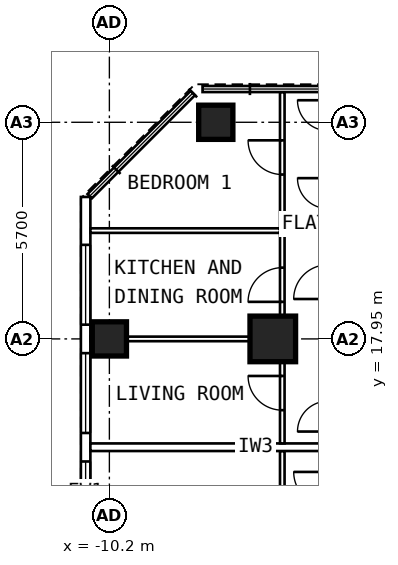
"""IFC4 building model, lengths in metres.
Left out: names, types, materials, properties, quantities, classifications, styles, units other than length and angle.
Written with IfcOpenShell. Run it as: python <this file> out.ifc"""

import sys

from ifc_helpers import new_model, si_unit, direction, frame, frame_2d, origin, origin_2d, place, context, subcontext, project, spatial, rectangle, extrude, element, fill, save


model = new_model("IFC4")
c1 = context("Model", 3, precision=1e-05, world=origin(), true_north=direction((0.0, 1.0)))
c2 = subcontext(c1, "Body", "Model", "MODEL_VIEW")
j1 = project(units=[si_unit("LENGTHUNIT", "METRE"), si_unit("PLANEANGLEUNIT", "RADIAN")], contexts=[c1])
p1 = place(None, origin())
s1 = spatial("IfcSite", under=j1, at=p1, CompositionType="ELEMENT")
p2 = place(p1, origin())
s2 = spatial("IfcBuilding", under=s1, at=p2, CompositionType="ELEMENT")
p3 = place(p2, frame((0.0, 0.0, 168.8)))
s3 = spatial("IfcBuildingStorey", under=s2, at=p3, CompositionType="ELEMENT", Elevation=168.8)
for number, where, z_axis, x_axis in (
    (1, (-10.2, 17.95, 0.0), (0.0, 0.0, 1.0), (0.0, 1.0, 0.0)),
    (2, (-7.4, 23.65, 0.0), (0.0, 0.0, 1.0), (0.0, 1.0, 0.0)),
):
    element("IfcColumn", number, at=place(p3, frame(where, z_axis=z_axis, x_axis=x_axis)), inside=s3, PredefinedType="COLUMN", context=c2, shape_type="SweptSolid", body=[
        extrude(rectangle(XDim=0.9, YDim=0.9, at=origin_2d()), origin(), (0.0, 0.0, 1.0), 3.6),
    ])
p4 = place(p3, frame((-5.9, 17.95, 0.0), z_axis=(0.0, 0.0, 1.0), x_axis=(0.0, 1.0, 0.0)))
e3 = element("IfcColumn", 3, at=p4, inside=s3, PredefinedType="COLUMN", context=c2, shape_type="SweptSolid", body=[
    extrude(rectangle(XDim=1.2, YDim=1.2, at=origin_2d()), origin(), (0.0, 0.0, 1.0), 3.6),
])
p5 = place(p3, frame((-10.825, 6.148, 0.0), z_axis=(0.0, 0.0, 1.0), x_axis=(0.0, 1.0, 0.0)))
e4 = element("IfcWall", 4, at=p5, inside=s3, PredefinedType="SOLIDWALL", context=c2, shape_type="SweptSolid", body=[
    extrude(rectangle(XDim=15.537, YDim=0.25, at=frame_2d((7.769, 0.0))), origin(), (0.0, 0.0, 1.0), 3.35),
])
p6 = place(p5, frame((0.777, 0.0, 0.8)))
e5 = element("IfcOpeningElement", 5, at=p6, cuts=e4, PredefinedType="OPENING", context=c2, shape_type="SweptSolid", body=[
    extrude(rectangle(XDim=2.1, YDim=1.8, at=frame_2d((1.05, 0.9))), frame((0.0, 0.137, 0.0), z_axis=(0.0, -1.0, 0.0), x_axis=(1.0, 0.0, 0.0)), (0.0, 0.0, 1.0), 0.274),
])
p7 = place(p5, frame((3.627, 0.0, 0.8)))
e6 = element("IfcOpeningElement", 6, at=p7, cuts=e4, PredefinedType="OPENING", context=c2, shape_type="SweptSolid", body=[
    extrude(rectangle(XDim=2.1, YDim=1.8, at=frame_2d((1.05, 0.9))), frame((0.0, 0.137, 0.0), z_axis=(0.0, -1.0, 0.0), x_axis=(1.0, 0.0, 0.0)), (0.0, 0.0, 1.0), 0.274),
])
p8 = place(p5, frame((6.477, 0.0, 0.8)))
e7 = element("IfcOpeningElement", 7, at=p8, cuts=e4, PredefinedType="OPENING", context=c2, shape_type="SweptSolid", body=[
    extrude(rectangle(XDim=2.1, YDim=1.8, at=frame_2d((1.05, 0.9))), frame((0.0, 0.137, 0.0), z_axis=(0.0, -1.0, 0.0), x_axis=(1.0, 0.0, 0.0)), (0.0, 0.0, 1.0), 0.274),
])
p9 = place(p5, frame((9.327, 0.0, 0.8)))
e8 = element("IfcOpeningElement", 8, at=p9, cuts=e4, PredefinedType="OPENING", context=c2, shape_type="SweptSolid", body=[
    extrude(rectangle(XDim=2.1, YDim=1.8, at=frame_2d((1.05, 0.9))), frame((0.0, 0.137, 0.0), z_axis=(0.0, -1.0, 0.0), x_axis=(1.0, 0.0, 0.0)), (0.0, 0.0, 1.0), 0.274),
])
p10 = place(p5, frame((12.177, 0.0, 0.8)))
e9 = element("IfcOpeningElement", 9, at=p10, cuts=e4, PredefinedType="OPENING", context=c2, shape_type="SweptSolid", body=[
    extrude(rectangle(XDim=2.1, YDim=1.8, at=frame_2d((1.05, 0.9))), frame((0.0, 0.137, 0.0), z_axis=(0.0, -1.0, 0.0), x_axis=(1.0, 0.0, 0.0)), (0.0, 0.0, 1.0), 0.274),
])
p11 = place(p3, frame((-5.65, 9.6, 0.0), z_axis=(0.0, 0.0, 1.0), x_axis=(0.0, 1.0, 0.0)))
e10 = element("IfcWall", 10, at=p11, inside=s3, PredefinedType="PARTITIONING", context=c2, shape_type="SweptSolid", body=[
    extrude(rectangle(XDim=5.4, YDim=0.12, at=frame_2d((2.7, 0.0))), origin(), (0.0, 0.0, 1.0), 3.35),
])
p12 = place(p11, frame((3.4, 0.0, 0.0)))
e11 = element("IfcOpeningElement", 11, at=p12, cuts=e10, PredefinedType="OPENING", context=c2, shape_type="SweptSolid", body=[
    extrude(rectangle(XDim=0.9, YDim=2.1, at=frame_2d((0.45, 1.05))), frame((0.0, 0.072, 0.0), z_axis=(0.0, -1.0, 0.0), x_axis=(1.0, 0.0, 0.0)), (0.0, 0.0, 1.0), 0.144),
])
p13 = place(p3, frame((-5.65, 15.2, 0.0), z_axis=(0.0, 0.0, 1.0), x_axis=(0.0, 1.0, 0.0)))
e12 = element("IfcWall", 12, at=p13, inside=s3, PredefinedType="PARTITIONING", context=c2, shape_type="SweptSolid", body=[
    extrude(rectangle(XDim=9.245, YDim=0.12, at=frame_2d((4.623, 0.0))), origin(), (0.0, 0.0, 1.0), 3.35),
])
p14 = place(p13, frame((0.875, 0.0, 0.0)))
e13 = element("IfcOpeningElement", 13, at=p14, cuts=e12, PredefinedType="OPENING", context=c2, shape_type="SweptSolid", body=[
    extrude(rectangle(XDim=0.9, YDim=2.1, at=frame_2d((0.45, 1.05))), frame((0.0, 0.072, 0.0), z_axis=(0.0, -1.0, 0.0), x_axis=(1.0, 0.0, 0.0)), (0.0, 0.0, 1.0), 0.144),
])
p15 = place(p13, frame((3.725, 0.0, 0.0)))
e14 = element("IfcOpeningElement", 14, at=p15, cuts=e12, PredefinedType="OPENING", context=c2, shape_type="SweptSolid", body=[
    extrude(rectangle(XDim=0.9, YDim=2.1, at=frame_2d((0.45, 1.05))), frame((0.0, 0.072, 0.0), z_axis=(0.0, -1.0, 0.0), x_axis=(1.0, 0.0, 0.0)), (0.0, 0.0, 1.0), 0.144),
])
p16 = place(p13, frame((7.075, 0.0, 0.0)))
e15 = element("IfcOpeningElement", 15, at=p16, cuts=e12, PredefinedType="OPENING", context=c2, shape_type="SweptSolid", body=[
    extrude(rectangle(XDim=0.9, YDim=2.1, at=frame_2d((0.45, 1.05))), frame((0.0, 0.072, 0.0), z_axis=(0.0, -1.0, 0.0), x_axis=(1.0, 0.0, 0.0)), (0.0, 0.0, 1.0), 0.144),
])
p17 = place(p3, frame((-5.71, 17.95, 0.0), z_axis=(0.0, 0.0, 1.0), x_axis=(-1.0, 0.0, 0.0)))
e16 = element("IfcWall", 16, at=p17, inside=s3, PredefinedType="PARTITIONING", context=c2, shape_type="SweptSolid", body=[
    extrude(rectangle(XDim=4.99, YDim=0.12, at=frame_2d((2.495, 0.0))), origin(), (0.0, 0.0, 1.0), 2.45),
])
p18 = place(p3, frame((-5.71, 20.8, 0.0), z_axis=(0.0, 0.0, 1.0), x_axis=(-1.0, 0.0, 0.0)))
e17 = element("IfcWall", 17, at=p18, inside=s3, PredefinedType="PARTITIONING", context=c2, shape_type="SweptSolid", body=[
    extrude(rectangle(XDim=4.99, YDim=0.12, at=frame_2d((2.495, 0.0))), origin(), (0.0, 0.0, 1.0), 3.35),
])
p19 = place(p3, frame((-2.0, 15.1, 0.0), z_axis=(0.0, 0.0, 1.0), x_axis=(-1.0, 0.0, 0.0)))
e18 = element("IfcWall", 18, at=p19, inside=s3, PredefinedType="PARTITIONING", context=c2, shape_type="SweptSolid", body=[
    extrude(rectangle(XDim=8.7, YDim=0.2, at=frame_2d((4.35, 0.0))), origin(), (0.0, 0.0, 1.0), 3.35),
])
p20 = place(p8, origin())
e19 = element("IfcWindow", 19, at=p20, inside=s3, PartitioningType="SINGLE_PANEL", PredefinedType="WINDOW", context=c2, shape_type="SweptSolid", body=[
    extrude(rectangle(XDim=2.1, YDim=1.8, at=frame_2d((1.05, 0.9))), frame((0.0, 0.03, 0.0), z_axis=(0.0, -1.0, 0.0), x_axis=(1.0, 0.0, 0.0)), (0.0, 0.0, 1.0), 0.06),
])
fill(e7, e19)
p21 = place(p9, origin())
e20 = element("IfcWindow", 20, at=p21, inside=s3, PartitioningType="SINGLE_PANEL", PredefinedType="WINDOW", context=c2, shape_type="SweptSolid", body=[
    extrude(rectangle(XDim=2.1, YDim=1.8, at=frame_2d((1.05, 0.9))), frame((0.0, 0.03, 0.0), z_axis=(0.0, -1.0, 0.0), x_axis=(1.0, 0.0, 0.0)), (0.0, 0.0, 1.0), 0.06),
])
fill(e8, e20)
p22 = place(p10, origin())
e21 = element("IfcWindow", 21, at=p22, inside=s3, PartitioningType="SINGLE_PANEL", PredefinedType="WINDOW", context=c2, shape_type="SweptSolid", body=[
    extrude(rectangle(XDim=2.1, YDim=1.8, at=frame_2d((1.05, 0.9))), frame((0.0, 0.03, 0.0), z_axis=(0.0, -1.0, 0.0), x_axis=(1.0, 0.0, 0.0)), (0.0, 0.0, 1.0), 0.06),
])
fill(e9, e21)
p23 = place(p14, origin())
e22 = element("IfcDoor", 22, at=p23, inside=s3, OperationType="SINGLE_SWING_RIGHT", PredefinedType="DOOR", context=c2, shape_type="SweptSolid", body=[
    extrude(rectangle(XDim=0.9, YDim=2.1, at=frame_2d((0.45, 1.05))), frame((0.0, 0.025, 0.0), z_axis=(0.0, -1.0, 0.0), x_axis=(1.0, 0.0, 0.0)), (0.0, 0.0, 1.0), 0.05),
])
fill(e13, e22)
p24 = place(p15, origin())
e23 = element("IfcDoor", 23, at=p24, inside=s3, OperationType="SINGLE_SWING_LEFT", PredefinedType="DOOR", context=c2, shape_type="SweptSolid", body=[
    extrude(rectangle(XDim=0.9, YDim=2.1, at=frame_2d((0.45, 1.05))), frame((0.0, 0.025, 0.0), z_axis=(0.0, -1.0, 0.0), x_axis=(1.0, 0.0, 0.0)), (0.0, 0.0, 1.0), 0.05),
])
fill(e14, e23)
p25 = place(p16, origin())
e24 = element("IfcDoor", 24, at=p25, inside=s3, OperationType="SINGLE_SWING_RIGHT", PredefinedType="DOOR", context=c2, shape_type="SweptSolid", body=[
    extrude(rectangle(XDim=0.9, YDim=2.1, at=frame_2d((0.45, 1.05))), frame((0.0, 0.025, 0.0), z_axis=(0.0, -1.0, 0.0), x_axis=(1.0, 0.0, 0.0)), (0.0, 0.0, 1.0), 0.05),
])
fill(e15, e24)
save(model, sys.argv[1])
